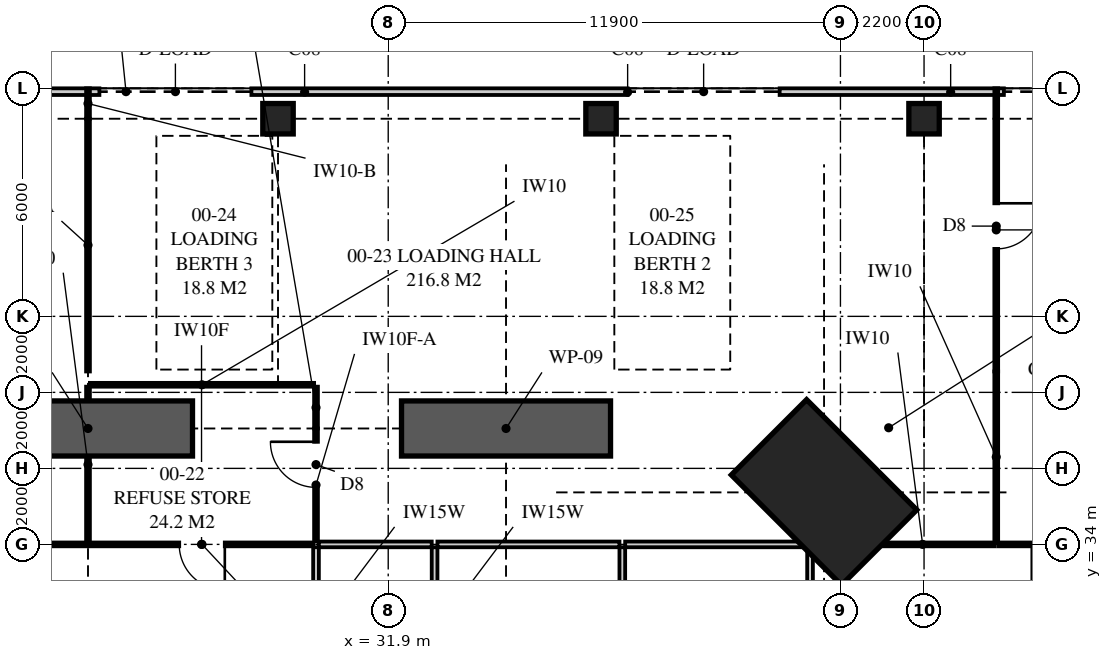
"""IFC4 building model, lengths in metres.
Left out: names, types, materials, properties, quantities, classifications, styles, units other than length and angle.
Written with IfcOpenShell. Run it as: python <this file> out.ifc"""

import sys

from ifc_helpers import new_model, si_unit, direction, frame, frame_2d, origin, origin_2d, place, context, subcontext, project, spatial, polyline, rectangle, outline, extrude, element, fill, save


model = new_model("IFC4")
c1 = context("Model", 3, precision=1e-05, world=origin(), true_north=direction((0.0, 1.0)))
c2 = subcontext(c1, "Body", "Model", "MODEL_VIEW")
j1 = project(units=[si_unit("LENGTHUNIT", "METRE"), si_unit("PLANEANGLEUNIT", "RADIAN")], contexts=[c1])
p1 = place(None, origin())
s1 = spatial("IfcSite", under=j1, at=p1, CompositionType="ELEMENT")
p2 = place(p1, origin())
s2 = spatial("IfcBuilding", under=s1, at=p2, CompositionType="ELEMENT")
p3 = place(p2, origin())
s3 = spatial("IfcBuildingStorey", under=s2, at=p3, CompositionType="ELEMENT", Elevation=0.0)
p4 = place(p3, frame((43.369, 35.369, 0.0), z_axis=(0.0, 0.0, 1.0), x_axis=(-0.707106781187, -0.707106781187, 0.0)))
e1 = element("IfcColumn", 1, at=p4, inside=s3, PredefinedType="COLUMN", context=c2, shape_type="SweptSolid", body=[
    extrude(rectangle(XDim=2.8, YDim=4.1, at=origin_2d()), origin(), (0.0, 0.0, 1.0), 6.0),
])
for number, where, z_axis, x_axis in (
    (2, (29.0, 45.2, 0.0), (0.0, 0.0, 1.0), (1.0, 0.0, 0.0)),
    (3, (37.5, 45.2, 0.0), (0.0, 0.0, 1.0), (1.0, 0.0, 0.0)),
    (4, (46.0, 45.2, 0.0), (0.0, 0.0, 1.0), (1.0, 0.0, 0.0)),
):
    element("IfcColumn", number, at=place(p3, frame(where, z_axis=z_axis, x_axis=x_axis)), inside=s3, PredefinedType="COLUMN", context=c2, shape_type="SweptSolid", body=[
        extrude(rectangle(XDim=0.8, YDim=0.8, at=origin_2d()), origin(), (0.0, 0.0, 1.0), 6.0),
    ])
p5 = place(p3, frame((59.2, 45.913, 0.0), z_axis=(0.0, 0.0, 1.0), x_axis=(-1.0, 0.0, 0.0)))
e5 = element("IfcWall", 5, at=p5, inside=s3, PredefinedType="SOLIDWALL", context=c2, shape_type="SweptSolid", body=[
    extrude(rectangle(XDim=68.4, YDim=0.175, at=frame_2d((34.2, 0.0))), origin(), (0.0, 0.0, 1.0), 5.12),
])
p6 = place(p5, frame((0.6, 0.0, 0.0)))
e6 = element("IfcOpeningElement", 6, at=p6, cuts=e5, PredefinedType="OPENING", context=c2, shape_type="SweptSolid", body=[
    extrude(rectangle(XDim=3.6, YDim=4.8, at=frame_2d((1.8, 2.4))), frame((0.0, 0.097, 0.0), z_axis=(0.0, -1.0, 0.0), x_axis=(1.0, 0.0, 0.0)), (0.0, 0.0, 1.0), 0.195),
])
p7 = place(p5, frame((7.1, 0.0, 0.0)))
e7 = element("IfcOpeningElement", 7, at=p7, cuts=e5, PredefinedType="OPENING", context=c2, shape_type="SweptSolid", body=[
    extrude(rectangle(XDim=4.0, YDim=3.0, at=frame_2d((2.0, 1.5))), frame((0.0, 0.097, 0.0), z_axis=(0.0, -1.0, 0.0), x_axis=(1.0, 0.0, 0.0)), (0.0, 0.0, 1.0), 0.195),
])
p8 = place(p5, frame((30.9, 0.0, 0.0)))
e8 = element("IfcOpeningElement", 8, at=p8, cuts=e5, PredefinedType="OPENING", context=c2, shape_type="SweptSolid", body=[
    extrude(rectangle(XDim=4.0, YDim=4.5, at=frame_2d((2.0, 2.25))), frame((0.0, 0.097, 0.0), z_axis=(0.0, -1.0, 0.0), x_axis=(1.0, 0.0, 0.0)), (0.0, 0.0, 1.0), 0.195),
])
p9 = place(p5, frame((17.0, 0.0, 0.0)))
e9 = element("IfcOpeningElement", 9, at=p9, cuts=e5, PredefinedType="OPENING", context=c2, shape_type="SweptSolid", body=[
    extrude(rectangle(XDim=4.0, YDim=4.5, at=frame_2d((2.0, 2.25))), frame((0.0, 0.097, 0.0), z_axis=(0.0, -1.0, 0.0), x_axis=(1.0, 0.0, 0.0)), (0.0, 0.0, 1.0), 0.195),
])
p10 = place(p5, frame((36.45, 0.0, 0.0)))
e10 = element("IfcOpeningElement", 10, at=p10, cuts=e5, PredefinedType="OPENING", context=c2, shape_type="SweptSolid", body=[
    extrude(rectangle(XDim=1.0, YDim=2.2, at=frame_2d((0.5, 1.1))), frame((0.0, 0.097, 0.0), z_axis=(0.0, -1.0, 0.0), x_axis=(1.0, 0.0, 0.0)), (0.0, 0.0, 1.0), 0.195),
])
p11 = place(p5, frame((51.95, 0.0, 0.0)))
e11 = element("IfcOpeningElement", 11, at=p11, cuts=e5, PredefinedType="OPENING", context=c2, shape_type="SweptSolid", body=[
    extrude(rectangle(XDim=2.0, YDim=2.7, at=frame_2d((1.0, 1.35))), frame((0.0, 0.097, 0.0), z_axis=(0.0, -1.0, 0.0), x_axis=(1.0, 0.0, 0.0)), (0.0, 0.0, 1.0), 0.195),
])
p12 = place(p5, frame((61.781, 0.0, 0.0)))
e12 = element("IfcOpeningElement", 12, at=p12, cuts=e5, PredefinedType="OPENING", context=c2, shape_type="SweptSolid", body=[
    extrude(rectangle(XDim=1.8, YDim=2.7, at=frame_2d((0.9, 1.35))), frame((0.0, 0.097, 0.0), z_axis=(0.0, -1.0, 0.0), x_axis=(1.0, 0.0, 0.0)), (0.0, 0.0, 1.0), 0.195),
])
p13 = place(p5, frame((57.666, 0.0, 0.3)))
e13 = element("IfcOpeningElement", 13, at=p13, cuts=e5, PredefinedType="OPENING", context=c2, shape_type="SweptSolid", body=[
    extrude(rectangle(XDim=2.4, YDim=3.0, at=frame_2d((1.2, 1.5))), frame((0.0, 0.097, 0.0), z_axis=(0.0, -1.0, 0.0), x_axis=(1.0, 0.0, 0.0)), (0.0, 0.0, 1.0), 0.195),
])
p14 = place(p5, frame((65.129, 0.0, 0.3)))
e14 = element("IfcOpeningElement", 14, at=p14, cuts=e5, PredefinedType="OPENING", context=c2, shape_type="SweptSolid", body=[
    extrude(rectangle(XDim=2.4, YDim=3.0, at=frame_2d((1.2, 1.5))), frame((0.0, 0.097, 0.0), z_axis=(0.0, -1.0, 0.0), x_axis=(1.0, 0.0, 0.0)), (0.0, 0.0, 1.0), 0.195),
])
p15 = place(p3, frame((30.0, 29.5, 0.0), z_axis=(0.0, 0.0, 1.0), x_axis=(0.0, 1.0, 0.0)))
e15 = element("IfcWall", 15, at=p15, inside=s3, PredefinedType="PLUMBINGWALL", context=c2, shape_type="SweptSolid", body=[
    extrude(rectangle(XDim=4.425, YDim=0.15, at=frame_2d((2.212, 0.0))), origin(), (0.0, 0.0, 1.0), 5.72),
])
p16 = place(p3, frame((17.65, 34.0, 0.0), z_axis=(0.0, 0.0, 1.0), x_axis=(1.0, 0.0, 0.0)))
e16 = element("IfcWall", 16, at=p16, inside=s3, PredefinedType="PARTITIONING", context=c2, shape_type="SweptSolid", body=[
    extrude(outline(polyline([(0.0, 0.0), (6.3, 0.0), (6.3, 5.72), (6.3, 5.12), (5.09, 5.12), (5.09, 5.72), (0.0, 5.72), (0.0, 0.0)])), frame((0.0, 0.05, 0.0), z_axis=(0.0, -1.0, 0.0), x_axis=(1.0, 0.0, 0.0)), (0.0, 0.0, 1.0), 0.1),
])
p17 = place(p16, frame((3.2, 0.0, 0.0)))
e17 = element("IfcOpeningElement", 17, at=p17, cuts=e16, PredefinedType="OPENING", context=c2, shape_type="SweptSolid", body=[
    extrude(rectangle(XDim=1.0, YDim=2.1, at=frame_2d((0.5, 1.05))), frame((0.0, 0.06, 0.0), z_axis=(0.0, -1.0, 0.0), x_axis=(1.0, 0.0, 0.0)), (0.0, 0.0, 1.0), 0.12),
])
p18 = place(p16, frame((0.946, 0.0, 0.0)))
e18 = element("IfcOpeningElement", 18, at=p18, cuts=e16, PredefinedType="OPENING", context=c2, shape_type="SweptSolid", body=[
    extrude(rectangle(XDim=1.0, YDim=2.1, at=frame_2d((0.5, 1.05))), frame((0.0, 0.06, 0.0), z_axis=(0.0, -1.0, 0.0), x_axis=(1.0, 0.0, 0.0)), (0.0, 0.0, 1.0), 0.12),
])
p19 = place(p3, frame((24.05, 34.0, 0.0), z_axis=(0.0, 0.0, 1.0), x_axis=(1.0, 0.0, 0.0)))
e19 = element("IfcWall", 19, at=p19, inside=s3, PredefinedType="PARTITIONING", context=c2, shape_type="SweptSolid", body=[
    extrude(outline(polyline([(0.0, 0.0), (5.875, 0.0), (5.875, 5.72), (1.21, 5.72), (1.21, 5.12), (0.0, 5.12), (0.0, 5.72), (0.0, 0.0)])), frame((0.0, 0.05, 0.0), z_axis=(0.0, -1.0, 0.0), x_axis=(1.0, 0.0, 0.0)), (0.0, 0.0, 1.0), 0.1),
])
p20 = place(p19, frame((2.35, 0.0, 0.0)))
e20 = element("IfcOpeningElement", 20, at=p20, cuts=e19, PredefinedType="OPENING", context=c2, shape_type="SweptSolid", body=[
    extrude(rectangle(XDim=1.2, YDim=2.4, at=frame_2d((0.6, 1.2))), frame((0.0, 0.06, 0.0), z_axis=(0.0, -1.0, 0.0), x_axis=(1.0, 0.0, 0.0)), (0.0, 0.0, 1.0), 0.12),
])
p21 = place(p3, frame((33.12, 29.5, 0.0), z_axis=(0.0, 0.0, 1.0), x_axis=(0.0, 1.0, 0.0)))
e21 = element("IfcWall", 21, at=p21, inside=s3, PredefinedType="PLUMBINGWALL", context=c2, shape_type="SweptSolid", body=[
    extrude(rectangle(XDim=4.425, YDim=0.15, at=frame_2d((2.212, 0.0))), origin(), (0.0, 0.0, 1.0), 5.72),
])
p22 = place(p3, frame((30.075, 34.0, 0.0), z_axis=(0.0, 0.0, 1.0), x_axis=(1.0, 0.0, 0.0)))
e22 = element("IfcWall", 22, at=p22, inside=s3, PredefinedType="PLUMBINGWALL", context=c2, shape_type="SweptSolid", body=[
    extrude(rectangle(XDim=2.97, YDim=0.15, at=frame_2d((1.485, 0.0))), origin(), (0.0, 0.0, 1.0), 5.72),
])
p23 = place(p3, frame((38.06, 29.5, 0.0), z_axis=(0.0, 0.0, 1.0), x_axis=(0.0, 1.0, 0.0)))
e23 = element("IfcWall", 23, at=p23, inside=s3, PredefinedType="PLUMBINGWALL", context=c2, shape_type="SweptSolid", body=[
    extrude(rectangle(XDim=4.425, YDim=0.15, at=frame_2d((2.212, 0.0))), origin(), (0.0, 0.0, 1.0), 5.72),
])
p24 = place(p3, frame((33.195, 34.0, 0.0), z_axis=(0.0, 0.0, 1.0), x_axis=(1.0, 0.0, 0.0)))
e24 = element("IfcWall", 24, at=p24, inside=s3, PredefinedType="PLUMBINGWALL", context=c2, shape_type="SweptSolid", body=[
    extrude(outline(polyline([(0.0, 0.0), (4.79, 0.0), (4.79, 5.72), (3.09, 5.72), (3.09, 5.12), (0.52, 5.12), (0.52, 5.72), (0.0, 5.72), (0.0, 0.0)])), frame((0.0, 0.075, 0.0), z_axis=(0.0, -1.0, 0.0), x_axis=(1.0, 0.0, 0.0)), (0.0, 0.0, 1.0), 0.15),
])
p25 = place(p3, frame((43.0, 29.5, 0.0), z_axis=(0.0, 0.0, 1.0), x_axis=(0.0, 1.0, 0.0)))
e25 = element("IfcWall", 25, at=p25, inside=s3, PredefinedType="PLUMBINGWALL", context=c2, shape_type="SweptSolid", body=[
    extrude(outline(polyline([(0.0, 0.0), (4.425, 0.0), (4.425, 5.72), (4.425, 5.12), (0.0, 5.12), (0.0, 5.72), (0.0, 0.0)])), frame((0.0, 0.075, 0.0), z_axis=(0.0, -1.0, 0.0), x_axis=(1.0, 0.0, 0.0)), (0.0, 0.0, 1.0), 0.15),
])
p26 = place(p3, frame((38.135, 34.0, 0.0), z_axis=(0.0, 0.0, 1.0), x_axis=(1.0, 0.0, 0.0)))
e26 = element("IfcWall", 26, at=p26, inside=s3, PredefinedType="PLUMBINGWALL", context=c2, shape_type="SweptSolid", body=[
    extrude(outline(polyline([(0.0, 0.0), (4.79, 0.0), (4.79, 5.72), (4.79, 5.12), (3.948, 5.12), (3.948, 5.72), (0.0, 5.72), (0.0, 0.0)])), frame((0.0, 0.075, 0.0), z_axis=(0.0, -1.0, 0.0), x_axis=(1.0, 0.0, 0.0)), (0.0, 0.0, 1.0), 0.15),
])
p27 = place(p3, frame((43.075, 34.0, 0.0), z_axis=(0.0, 0.0, 1.0), x_axis=(1.0, 0.0, 0.0)))
e27 = element("IfcWall", 27, at=p27, inside=s3, PredefinedType="PARTITIONING", context=c2, shape_type="SweptSolid", body=[
    extrude(outline(polyline([(0.0, 0.0), (4.775, 0.0), (4.775, 5.72), (1.554, 5.72), (1.554, 5.12), (0.0, 5.12), (0.0, 5.72), (0.0, 0.0)])), frame((0.0, 0.05, 0.0), z_axis=(0.0, -1.0, 0.0), x_axis=(1.0, 0.0, 0.0)), (0.0, 0.0, 1.0), 0.1),
])
p28 = place(p3, frame((48.9, 29.45, 0.0), z_axis=(0.0, 0.0, 1.0), x_axis=(0.0, 1.0, 0.0)))
e28 = element("IfcWall", 28, at=p28, inside=s3, PredefinedType="PARTITIONING", context=c2, shape_type="SweptSolid", body=[
    extrude(outline(polyline([(0.0, 0.0), (4.5, 0.0), (4.5, 5.72), (4.5, 5.12), (0.01, 5.12), (0.0, 5.12), (0.0, 5.72), (0.0, 0.0)])), frame((0.0, 0.05, 0.0), z_axis=(0.0, -1.0, 0.0), x_axis=(1.0, 0.0, 0.0)), (0.0, 0.0, 1.0), 0.1),
])
p29 = place(p3, frame((47.95, 34.0, 0.0), z_axis=(0.0, 0.0, 1.0), x_axis=(1.0, 0.0, 0.0)))
e29 = element("IfcWall", 29, at=p29, inside=s3, PredefinedType="PARTITIONING", context=c2, shape_type="SweptSolid", body=[
    extrude(outline(polyline([(0.0, 0.0), (0.9, 0.0), (0.9, 5.72), (0.9, 5.12), (0.29, 5.12), (0.29, 5.72), (0.0, 5.72), (0.0, 0.0)])), frame((0.0, 0.05, 0.0), z_axis=(0.0, -1.0, 0.0), x_axis=(1.0, 0.0, 0.0)), (0.0, 0.0, 1.0), 0.1),
])
p30 = place(p3, frame((24.0, 34.05, 0.0), z_axis=(0.0, 0.0, 1.0), x_axis=(0.0, 1.0, 0.0)))
e30 = element("IfcWall", 30, at=p30, inside=s3, PredefinedType="PARTITIONING", context=c2, shape_type="SweptSolid", body=[
    extrude(outline(polyline([(0.0, 0.0), (4.1, 0.0), (4.1, 5.72), (4.1, 5.12), (3.06, 5.12), (0.0, 5.12), (0.0, 5.72), (0.0, 0.0)])), frame((0.0, 0.05, 0.0), z_axis=(0.0, -1.0, 0.0), x_axis=(1.0, 0.0, 0.0)), (0.0, 0.0, 1.0), 0.1),
])
p31 = place(p3, frame((24.0, 38.55, 0.0), z_axis=(0.0, 0.0, 1.0), x_axis=(0.0, 1.0, 0.0)))
e31 = element("IfcWall", 31, at=p31, inside=s3, PredefinedType="PARTITIONING", context=c2, shape_type="SweptSolid", body=[
    extrude(rectangle(XDim=6.65, YDim=0.1, at=frame_2d((3.325, 0.0))), origin(), (0.0, 0.0, 1.0), 5.12),
])
p32 = place(p3, frame((24.0, 45.2, 0.0), z_axis=(0.0, 0.0, 1.0), x_axis=(0.0, 1.0, 0.0)))
e32 = element("IfcWall", 32, at=p32, inside=s3, PredefinedType="PARTITIONING", context=c2, shape_type="SweptSolid", body=[
    extrude(rectangle(XDim=0.8, YDim=0.1, at=frame_2d((0.4, 0.0))), origin(), (0.0, 0.0, 1.0), 5.12),
])
p33 = place(p3, frame((30.0, 34.075, 0.0), z_axis=(0.0, 0.0, 1.0), x_axis=(0.0, 1.0, 0.0)))
e33 = element("IfcWall", 33, at=p33, inside=s3, PredefinedType="PARTITIONING", context=c2, shape_type="SweptSolid", body=[
    extrude(outline(polyline([(0.0, 0.0), (2.975, 0.0), (2.975, 5.12), (1.715, 5.12), (1.715, 5.72), (0.0, 5.72), (0.0, 0.0)])), frame((0.0, 0.05, 0.0), z_axis=(0.0, -1.0, 0.0), x_axis=(1.0, 0.0, 0.0)), (0.0, 0.0, 1.0), 0.1),
])
p34 = place(p33, frame((1.425, 0.0, 0.0)))
e34 = element("IfcOpeningElement", 34, at=p34, cuts=e33, PredefinedType="OPENING", context=c2, shape_type="SweptSolid", body=[
    extrude(rectangle(XDim=1.2, YDim=2.4, at=frame_2d((0.6, 1.2))), frame((0.0, 0.06, 0.0), z_axis=(0.0, -1.0, 0.0), x_axis=(1.0, 0.0, 0.0)), (0.0, 0.0, 1.0), 0.12),
])
p35 = place(p3, frame((30.0, 37.05, 0.0), z_axis=(0.0, 0.0, 1.0), x_axis=(0.0, 1.0, 0.0)))
e35 = element("IfcWall", 35, at=p35, inside=s3, PredefinedType="PARTITIONING", context=c2, shape_type="SweptSolid", body=[
    extrude(rectangle(XDim=1.1, YDim=0.1, at=frame_2d((0.55, 0.0))), origin(), (0.0, 0.0, 1.0), 5.12),
])
p36 = place(p3, frame((24.05, 38.2, 0.0), z_axis=(0.0, 0.0, 1.0), x_axis=(1.0, 0.0, 0.0)))
e36 = element("IfcWall", 36, at=p36, inside=s3, PredefinedType="PARTITIONING", context=c2, shape_type="SweptSolid", body=[
    extrude(outline(polyline([(0.0, 0.0), (5.9, 0.0), (5.9, 5.72), (5.9, 5.12), (1.21, 5.12), (0.01, 5.12), (0.0, 5.12), (0.0, 5.72), (0.0, 0.0)])), frame((0.0, 0.05, 0.0), z_axis=(0.0, -1.0, 0.0), x_axis=(1.0, 0.0, 0.0)), (0.0, 0.0, 1.0), 0.1),
])
p37 = place(p3, frame((47.9, 34.05, 0.0), z_axis=(0.0, 0.0, 1.0), x_axis=(0.0, 1.0, 0.0)))
e37 = element("IfcWall", 37, at=p37, inside=s3, PredefinedType="PARTITIONING", context=c2, shape_type="SweptSolid", body=[
    extrude(outline(polyline([(0.0, 0.0), (4.5, 0.0), (4.5, 5.72), (2.579, 5.72), (2.579, 5.12), (0.059, 5.12), (0.059, 5.72), (0.0, 5.72), (0.0, 0.0)])), frame((0.0, 0.05, 0.0), z_axis=(0.0, -1.0, 0.0), x_axis=(1.0, 0.0, 0.0)), (0.0, 0.0, 1.0), 0.1),
])
p38 = place(p3, frame((47.9, 38.55, 0.0), z_axis=(0.0, 0.0, 1.0), x_axis=(0.0, 1.0, 0.0)))
e38 = element("IfcWall", 38, at=p38, inside=s3, PredefinedType="PARTITIONING", context=c2, shape_type="SweptSolid", body=[
    extrude(outline(polyline([(0.0, 0.0), (7.45, 0.0), (7.45, 5.72), (7.45, 5.12), (5.39, 5.12), (5.39, 5.72), (0.0, 5.72), (0.0, 0.0)])), frame((0.0, 0.05, 0.0), z_axis=(0.0, -1.0, 0.0), x_axis=(1.0, 0.0, 0.0)), (0.0, 0.0, 1.0), 0.1),
])
p39 = place(p38, frame((3.225, 0.0, 0.0)))
e39 = element("IfcOpeningElement", 39, at=p39, cuts=e38, PredefinedType="OPENING", context=c2, shape_type="SweptSolid", body=[
    extrude(rectangle(XDim=1.2, YDim=2.4, at=frame_2d((0.6, 1.2))), frame((0.0, 0.06, 0.0), z_axis=(0.0, -1.0, 0.0), x_axis=(1.0, 0.0, 0.0)), (0.0, 0.0, 1.0), 0.12),
])
for number, where, z_axis, x_axis in (
    (40, (32.25, 37.05, 0.0), (0.0, 0.0, 1.0), (1.0, 0.0, 0.0)),
    (41, (21.25, 37.05, 0.0), (0.0, 0.0, 1.0), (1.0, 0.0, 0.0)),
):
    element("IfcWall", number, at=place(p3, frame(where, z_axis=z_axis, x_axis=x_axis)), inside=s3, PredefinedType="SHEAR", context=c2, shape_type="SweptSolid", body=[
        extrude(rectangle(XDim=5.5, YDim=1.45, at=frame_2d((2.75, 0.0))), origin(), (0.0, 0.0, 1.0), 6.0),
    ])
p40 = place(p7, frame((4.0, 0.0, 0.0), z_axis=(0.0, 0.0, 1.0), x_axis=(-1.0, 0.0, 0.0)))
e42 = element("IfcDoor", 42, at=p40, inside=s3, OperationType="ROLLINGUP", PredefinedType="DOOR", context=c2, shape_type="SweptSolid", body=[
    extrude(rectangle(XDim=4.0, YDim=3.0, at=frame_2d((2.0, 1.5))), frame((0.0, 0.025, 0.0), z_axis=(0.0, -1.0, 0.0), x_axis=(1.0, 0.0, 0.0)), (0.0, 0.0, 1.0), 0.05),
])
fill(e7, e42)
p41 = place(p8, frame((4.0, 0.0, 0.0), z_axis=(0.0, 0.0, 1.0), x_axis=(-1.0, 0.0, 0.0)))
e43 = element("IfcDoor", 43, at=p41, inside=s3, OperationType="ROLLINGUP", PredefinedType="DOOR", context=c2, shape_type="SweptSolid", body=[
    extrude(rectangle(XDim=4.0, YDim=4.5, at=frame_2d((2.0, 2.25))), frame((0.0, 0.025, 0.0), z_axis=(0.0, -1.0, 0.0), x_axis=(1.0, 0.0, 0.0)), (0.0, 0.0, 1.0), 0.05),
])
fill(e8, e43)
p42 = place(p9, frame((4.0, 0.0, 0.0), z_axis=(0.0, 0.0, 1.0), x_axis=(-1.0, 0.0, 0.0)))
e44 = element("IfcDoor", 44, at=p42, inside=s3, OperationType="ROLLINGUP", PredefinedType="DOOR", context=c2, shape_type="SweptSolid", body=[
    extrude(rectangle(XDim=4.0, YDim=4.5, at=frame_2d((2.0, 2.25))), frame((0.0, 0.025, 0.0), z_axis=(0.0, -1.0, 0.0), x_axis=(1.0, 0.0, 0.0)), (0.0, 0.0, 1.0), 0.05),
])
fill(e9, e44)
p43 = place(p20, frame((1.2, 0.0, 0.0), z_axis=(0.0, 0.0, 1.0), x_axis=(-1.0, 0.0, 0.0)))
e45 = element("IfcDoor", 45, at=p43, inside=s3, OperationType="SINGLE_SWING_LEFT", PredefinedType="DOOR", context=c2, shape_type="SweptSolid", body=[
    extrude(rectangle(XDim=1.2, YDim=2.4, at=frame_2d((0.6, 1.2))), frame((0.0, 0.025, 0.0), z_axis=(0.0, -1.0, 0.0), x_axis=(1.0, 0.0, 0.0)), (0.0, 0.0, 1.0), 0.05),
])
fill(e20, e45)
p44 = place(p34, origin())
e46 = element("IfcDoor", 46, at=p44, inside=s3, OperationType="SINGLE_SWING_RIGHT", PredefinedType="DOOR", context=c2, shape_type="SweptSolid", body=[
    extrude(rectangle(XDim=1.2, YDim=2.4, at=frame_2d((0.6, 1.2))), frame((0.0, 0.025, 0.0), z_axis=(0.0, -1.0, 0.0), x_axis=(1.0, 0.0, 0.0)), (0.0, 0.0, 1.0), 0.05),
])
fill(e34, e46)
p45 = place(p39, frame((1.2, 0.0, 0.0), z_axis=(0.0, 0.0, 1.0), x_axis=(-1.0, 0.0, 0.0)))
e47 = element("IfcDoor", 47, at=p45, inside=s3, OperationType="SINGLE_SWING_LEFT", PredefinedType="DOOR", context=c2, shape_type="SweptSolid", body=[
    extrude(rectangle(XDim=1.2, YDim=2.4, at=frame_2d((0.6, 1.2))), frame((0.0, 0.025, 0.0), z_axis=(0.0, -1.0, 0.0), x_axis=(1.0, 0.0, 0.0)), (0.0, 0.0, 1.0), 0.05),
])
fill(e39, e47)
save(model, sys.argv[1])
